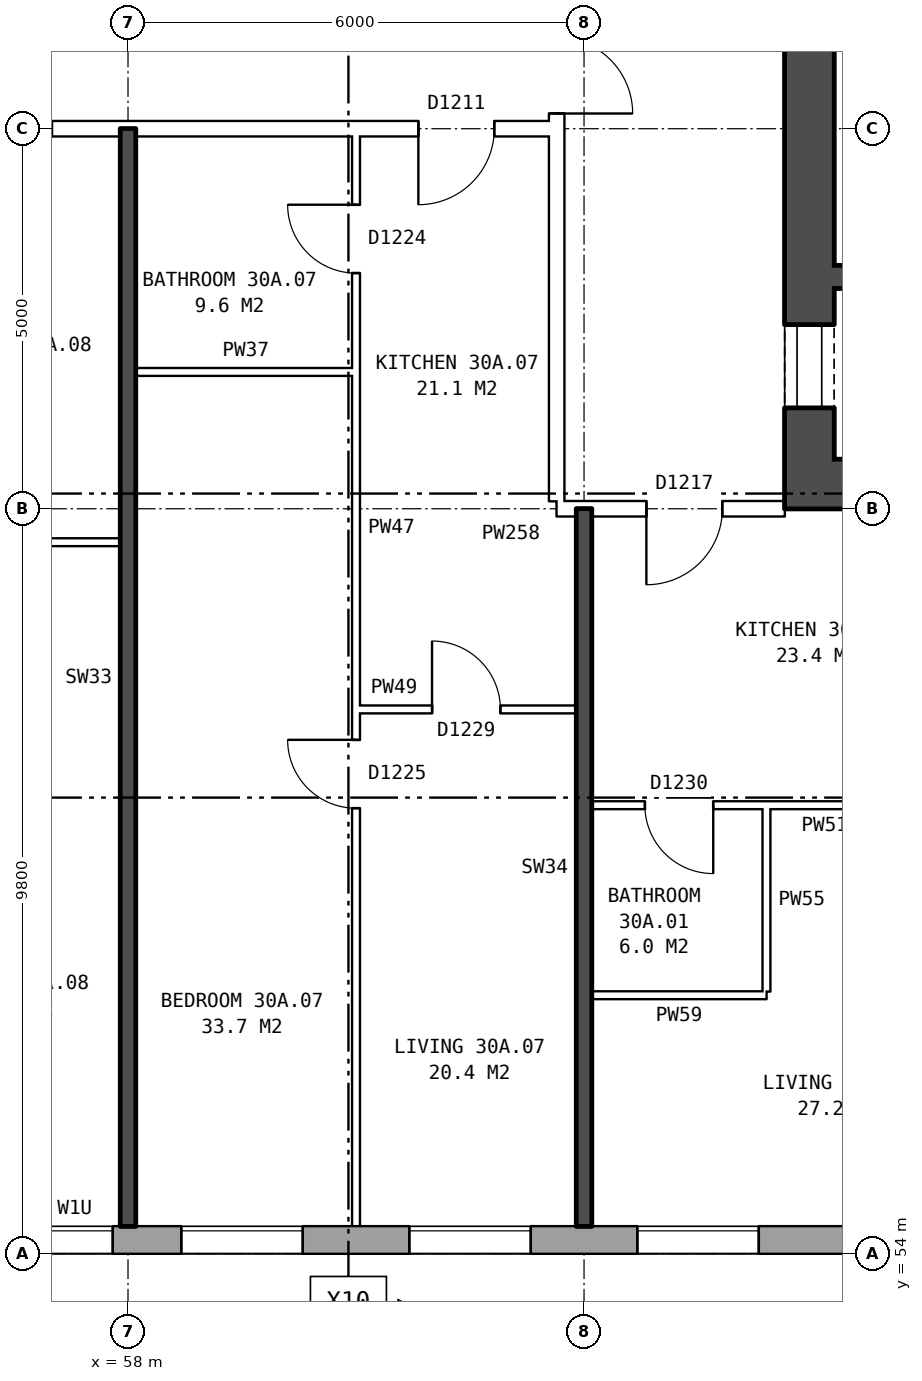
"""IFC4 building model, lengths in metres.
Left out: names, types, materials, properties, quantities, classifications, styles, units other than length and angle.
Written with IfcOpenShell. Run it as: python <this file> out.ifc"""

import sys

from ifc_helpers import new_model, si_unit, direction, frame, frame_2d, origin, place, context, subcontext, project, spatial, rectangle, extrude, element, fill, save


model = new_model("IFC4")
c1 = context("Model", 3, precision=1e-05, world=origin(), true_north=direction((0.0, 1.0)))
c2 = subcontext(c1, "Body", "Model", "MODEL_VIEW")
j1 = project(units=[si_unit("LENGTHUNIT", "METRE"), si_unit("PLANEANGLEUNIT", "RADIAN")], contexts=[c1])
p1 = place(None, origin())
s1 = spatial("IfcSite", under=j1, at=p1, CompositionType="ELEMENT")
p2 = place(p1, origin())
s2 = spatial("IfcBuilding", under=s1, at=p2, CompositionType="ELEMENT")
p3 = place(p2, frame((0.0, 0.0, 108.8)))
s3 = spatial("IfcBuildingStorey", under=s2, at=p3, CompositionType="ELEMENT", Elevation=108.8)
p4 = place(p3, frame((28.075, 54.18, 0.0), z_axis=(0.0, 0.0, 1.0), x_axis=(1.0, 0.0, 0.0)))
e1 = element("IfcWall", 1, at=p4, inside=s3, PredefinedType="STANDARD", context=c2, shape_type="SweptSolid", body=[
    extrude(rectangle(XDim=44.851, YDim=0.36, at=frame_2d((22.425, 0.0))), origin(), (0.0, 0.0, 1.0), 2.85),
])
p5 = place(p4, frame((0.625, 0.0, 0.8)))
e2 = element("IfcOpeningElement", 2, at=p5, cuts=e1, PredefinedType="OPENING", context=c2, shape_type="SweptSolid", body=[
    extrude(rectangle(XDim=1.6, YDim=1.8, at=frame_2d((0.8, 0.9))), frame((0.0, 0.19, 0.0), z_axis=(0.0, -1.0, 0.0), x_axis=(1.0, 0.0, 0.0)), (0.0, 0.0, 1.0), 0.38),
])
p6 = place(p4, frame((3.625, 0.0, 0.8)))
e3 = element("IfcOpeningElement", 3, at=p6, cuts=e1, PredefinedType="OPENING", context=c2, shape_type="SweptSolid", body=[
    extrude(rectangle(XDim=1.6, YDim=1.8, at=frame_2d((0.8, 0.9))), frame((0.0, 0.19, 0.0), z_axis=(0.0, -1.0, 0.0), x_axis=(1.0, 0.0, 0.0)), (0.0, 0.0, 1.0), 0.38),
])
p7 = place(p4, frame((6.625, 0.0, 0.8)))
e4 = element("IfcOpeningElement", 4, at=p7, cuts=e1, PredefinedType="OPENING", context=c2, shape_type="SweptSolid", body=[
    extrude(rectangle(XDim=1.6, YDim=1.8, at=frame_2d((0.8, 0.9))), frame((0.0, 0.19, 0.0), z_axis=(0.0, -1.0, 0.0), x_axis=(1.0, 0.0, 0.0)), (0.0, 0.0, 1.0), 0.38),
])
p8 = place(p4, frame((9.625, 0.0, 0.8)))
e5 = element("IfcOpeningElement", 5, at=p8, cuts=e1, PredefinedType="OPENING", context=c2, shape_type="SweptSolid", body=[
    extrude(rectangle(XDim=1.6, YDim=1.8, at=frame_2d((0.8, 0.9))), frame((0.0, 0.19, 0.0), z_axis=(0.0, -1.0, 0.0), x_axis=(1.0, 0.0, 0.0)), (0.0, 0.0, 1.0), 0.38),
])
p9 = place(p4, frame((12.625, 0.0, 0.8)))
e6 = element("IfcOpeningElement", 6, at=p9, cuts=e1, PredefinedType="OPENING", context=c2, shape_type="SweptSolid", body=[
    extrude(rectangle(XDim=1.6, YDim=1.8, at=frame_2d((0.8, 0.9))), frame((0.0, 0.19, 0.0), z_axis=(0.0, -1.0, 0.0), x_axis=(1.0, 0.0, 0.0)), (0.0, 0.0, 1.0), 0.38),
])
p10 = place(p4, frame((14.525, 0.0, 1.4)))
e7 = element("IfcOpeningElement", 7, at=p10, cuts=e1, PredefinedType="OPENING", context=c2, shape_type="SweptSolid", body=[
    extrude(rectangle(XDim=1.2, YDim=1.2, at=frame_2d((0.6, 0.6))), frame((0.0, 0.19, 0.0), z_axis=(0.0, -1.0, 0.0), x_axis=(1.0, 0.0, 0.0)), (0.0, 0.0, 1.0), 0.38),
])
p11 = place(p4, frame((18.625, 0.0, 0.8)))
e8 = element("IfcOpeningElement", 8, at=p11, cuts=e1, PredefinedType="OPENING", context=c2, shape_type="SweptSolid", body=[
    extrude(rectangle(XDim=1.6, YDim=1.8, at=frame_2d((0.8, 0.9))), frame((0.0, 0.19, 0.0), z_axis=(0.0, -1.0, 0.0), x_axis=(1.0, 0.0, 0.0)), (0.0, 0.0, 1.0), 0.38),
])
p12 = place(p4, frame((21.625, 0.0, 0.8)))
e9 = element("IfcOpeningElement", 9, at=p12, cuts=e1, PredefinedType="OPENING", context=c2, shape_type="SweptSolid", body=[
    extrude(rectangle(XDim=1.6, YDim=1.8, at=frame_2d((0.8, 0.9))), frame((0.0, 0.19, 0.0), z_axis=(0.0, -1.0, 0.0), x_axis=(1.0, 0.0, 0.0)), (0.0, 0.0, 1.0), 0.38),
])
p13 = place(p4, frame((24.625, 0.0, 0.8)))
e10 = element("IfcOpeningElement", 10, at=p13, cuts=e1, PredefinedType="OPENING", context=c2, shape_type="SweptSolid", body=[
    extrude(rectangle(XDim=1.6, YDim=1.8, at=frame_2d((0.8, 0.9))), frame((0.0, 0.19, 0.0), z_axis=(0.0, -1.0, 0.0), x_axis=(1.0, 0.0, 0.0)), (0.0, 0.0, 1.0), 0.38),
])
p14 = place(p4, frame((27.075, 0.0, 0.15)))
e11 = element("IfcOpeningElement", 11, at=p14, cuts=e1, PredefinedType="OPENING", context=c2, shape_type="SweptSolid", body=[
    extrude(rectangle(XDim=1.2, YDim=0.9, at=frame_2d((0.6, 0.45))), frame((0.0, 0.19, 0.0), z_axis=(0.0, -1.0, 0.0), x_axis=(1.0, 0.0, 0.0)), (0.0, 0.0, 1.0), 0.38),
])
p15 = place(p4, frame((30.625, 0.0, 0.8)))
e12 = element("IfcOpeningElement", 12, at=p15, cuts=e1, PredefinedType="OPENING", context=c2, shape_type="SweptSolid", body=[
    extrude(rectangle(XDim=1.6, YDim=1.8, at=frame_2d((0.8, 0.9))), frame((0.0, 0.19, 0.0), z_axis=(0.0, -1.0, 0.0), x_axis=(1.0, 0.0, 0.0)), (0.0, 0.0, 1.0), 0.38),
])
p16 = place(p4, frame((33.625, 0.0, 0.8)))
e13 = element("IfcOpeningElement", 13, at=p16, cuts=e1, PredefinedType="OPENING", context=c2, shape_type="SweptSolid", body=[
    extrude(rectangle(XDim=1.6, YDim=1.8, at=frame_2d((0.8, 0.9))), frame((0.0, 0.19, 0.0), z_axis=(0.0, -1.0, 0.0), x_axis=(1.0, 0.0, 0.0)), (0.0, 0.0, 1.0), 0.38),
])
p17 = place(p4, frame((36.625, 0.0, 0.8)))
e14 = element("IfcOpeningElement", 14, at=p17, cuts=e1, PredefinedType="OPENING", context=c2, shape_type="SweptSolid", body=[
    extrude(rectangle(XDim=1.6, YDim=1.8, at=frame_2d((0.8, 0.9))), frame((0.0, 0.19, 0.0), z_axis=(0.0, -1.0, 0.0), x_axis=(1.0, 0.0, 0.0)), (0.0, 0.0, 1.0), 0.38),
])
p18 = place(p4, frame((39.625, 0.0, 0.8)))
e15 = element("IfcOpeningElement", 15, at=p18, cuts=e1, PredefinedType="OPENING", context=c2, shape_type="SweptSolid", body=[
    extrude(rectangle(XDim=1.6, YDim=1.8, at=frame_2d((0.8, 0.9))), frame((0.0, 0.19, 0.0), z_axis=(0.0, -1.0, 0.0), x_axis=(1.0, 0.0, 0.0)), (0.0, 0.0, 1.0), 0.38),
])
p19 = place(p4, frame((42.625, 0.0, 0.8)))
e16 = element("IfcOpeningElement", 16, at=p19, cuts=e1, PredefinedType="OPENING", context=c2, shape_type="SweptSolid", body=[
    extrude(rectangle(XDim=1.6, YDim=1.8, at=frame_2d((0.8, 0.9))), frame((0.0, 0.19, 0.0), z_axis=(0.0, -1.0, 0.0), x_axis=(1.0, 0.0, 0.0)), (0.0, 0.0, 1.0), 0.38),
])
p20 = place(p4, frame((28.725, 0.0, 1.65)))
e17 = element("IfcOpeningElement", 17, at=p20, cuts=e1, PredefinedType="OPENING", context=c2, shape_type="SweptSolid", body=[
    extrude(rectangle(XDim=1.0, YDim=0.9, at=frame_2d((0.5, 0.45))), frame((0.0, 0.19, 0.0), z_axis=(0.0, -1.0, 0.0), x_axis=(1.0, 0.0, 0.0)), (0.0, 0.0, 1.0), 0.38),
])
p21 = place(p3, frame((66.965, 64.45, 0.0), z_axis=(0.0, 0.0, 1.0), x_axis=(0.0, 1.0, 0.0)))
e18 = element("IfcWall", 18, at=p21, inside=s3, PredefinedType="SHEAR", context=c2, shape_type="SweptSolid", body=[
    extrude(rectangle(XDim=11.1, YDim=0.65, at=frame_2d((5.55, 0.0))), origin(), (0.0, 0.0, 1.0), 2.85),
])
p22 = place(p21, frame((0.675, 0.0, 0.0)))
e19 = element("IfcOpeningElement", 19, at=p22, cuts=e18, PredefinedType="OPENING", context=c2, shape_type="SweptSolid", body=[
    extrude(rectangle(XDim=1.1, YDim=2.1, at=frame_2d((0.55, 1.05))), frame((0.0, 0.335, 0.0), z_axis=(0.0, -1.0, 0.0), x_axis=(1.0, 0.0, 0.0)), (0.0, 0.0, 1.0), 0.67),
])
p23 = place(p21, frame((9.25, 0.0, 0.0)))
e20 = element("IfcOpeningElement", 20, at=p23, cuts=e18, PredefinedType="OPENING", context=c2, shape_type="SweptSolid", body=[
    extrude(rectangle(XDim=1.1, YDim=2.1, at=frame_2d((0.55, 1.05))), frame((0.0, 0.335, 0.0), z_axis=(0.0, -1.0, 0.0), x_axis=(1.0, 0.0, 0.0)), (0.0, 0.0, 1.0), 0.67),
])
p24 = place(p3, frame((66.64, 64.125, 0.0), z_axis=(0.0, 0.0, 1.0), x_axis=(1.0, 0.0, 0.0)))
e21 = element("IfcWall", 21, at=p24, inside=s3, PredefinedType="SHEAR", context=c2, shape_type="SweptSolid", body=[
    extrude(rectangle(XDim=9.0, YDim=0.65, at=frame_2d((4.5, 0.0))), origin(), (0.0, 0.0, 1.0), 2.85),
])
p25 = place(p3, frame((67.29, 66.85, 0.0), z_axis=(0.0, 0.0, 1.0), x_axis=(1.0, 0.0, 0.0)))
e22 = element("IfcWall", 22, at=p25, inside=s3, PredefinedType="SHEAR", context=c2, shape_type="SweptSolid", body=[
    extrude(rectangle(XDim=3.37, YDim=0.3, at=frame_2d((1.685, 0.0))), origin(), (0.0, 0.0, 1.0), 2.85),
])
p26 = place(p3, frame((63.64, 63.9, 0.0), z_axis=(0.0, 0.0, 1.0), x_axis=(0.0, 1.0, 0.0)))
e23 = element("IfcWall", 23, at=p26, inside=s3, PredefinedType="PARTITIONING", context=c2, shape_type="SweptSolid", body=[
    extrude(rectangle(XDim=12.2, YDim=0.2, at=frame_2d((6.1, 0.0))), origin(), (0.0, 0.0, 1.0), 2.85),
])
p27 = place(p26, frame((5.1, 0.0, 0.0)))
e24 = element("IfcOpeningElement", 24, at=p27, cuts=e23, PredefinedType="OPENING", context=c2, shape_type="SweptSolid", body=[
    extrude(rectangle(XDim=2.0, YDim=2.1, at=frame_2d((1.0, 1.05))), frame((0.0, 0.11, 0.0), z_axis=(0.0, -1.0, 0.0), x_axis=(1.0, 0.0, 0.0)), (0.0, 0.0, 1.0), 0.22),
])
p28 = place(p3, frame((64.1, 57.4, 0.0), z_axis=(0.0, 0.0, 1.0), x_axis=(1.0, 0.0, 0.0)))
e25 = element("IfcWall", 25, at=p28, inside=s3, PredefinedType="PARTITIONING", context=c2, shape_type="SweptSolid", body=[
    extrude(rectangle(XDim=2.3, YDim=0.1, at=frame_2d((1.15, 0.0))), origin(), (0.0, 0.0, 1.0), 2.85),
])
p29 = place(p3, frame((64.1, 59.9, 0.0), z_axis=(0.0, 0.0, 1.0), x_axis=(1.0, 0.0, 0.0)))
e26 = element("IfcWall", 26, at=p29, inside=s3, PredefinedType="PARTITIONING", context=c2, shape_type="SweptSolid", body=[
    extrude(rectangle(XDim=5.8, YDim=0.1, at=frame_2d((2.9, 0.0))), origin(), (0.0, 0.0, 1.0), 2.85),
])
p30 = place(p29, frame((3.6, 0.0, 0.0)))
e27 = element("IfcOpeningElement", 27, at=p30, cuts=e26, PredefinedType="OPENING", context=c2, shape_type="SweptSolid", body=[
    extrude(rectangle(XDim=0.9, YDim=2.1, at=frame_2d((0.45, 1.05))), frame((0.0, 0.06, 0.0), z_axis=(0.0, -1.0, 0.0), x_axis=(1.0, 0.0, 0.0)), (0.0, 0.0, 1.0), 0.12),
])
p31 = place(p29, frame((0.7, 0.0, 0.0)))
e28 = element("IfcOpeningElement", 28, at=p31, cuts=e26, PredefinedType="OPENING", context=c2, shape_type="SweptSolid", body=[
    extrude(rectangle(XDim=0.9, YDim=2.1, at=frame_2d((0.45, 1.05))), frame((0.0, 0.06, 0.0), z_axis=(0.0, -1.0, 0.0), x_axis=(1.0, 0.0, 0.0)), (0.0, 0.0, 1.0), 0.12),
])
p32 = place(p3, frame((61.0, 61.16, 0.0), z_axis=(0.0, 0.0, 1.0), x_axis=(1.0, 0.0, 0.0)))
e29 = element("IfcWall", 29, at=p32, inside=s3, PredefinedType="PARTITIONING", context=c2, shape_type="SweptSolid", body=[
    extrude(rectangle(XDim=2.9, YDim=0.1, at=frame_2d((1.45, 0.0))), origin(), (0.0, 0.0, 1.0), 2.85),
])
p33 = place(p32, frame((1.0, 0.0, 0.0)))
e30 = element("IfcOpeningElement", 30, at=p33, cuts=e29, PredefinedType="OPENING", context=c2, shape_type="SweptSolid", body=[
    extrude(rectangle(XDim=0.9, YDim=2.1, at=frame_2d((0.45, 1.05))), frame((0.0, 0.06, 0.0), z_axis=(0.0, -1.0, 0.0), x_axis=(1.0, 0.0, 0.0)), (0.0, 0.0, 1.0), 0.12),
])
p34 = place(p3, frame((55.0, 63.36, 0.0), z_axis=(0.0, 0.0, 1.0), x_axis=(1.0, 0.0, 0.0)))
e31 = element("IfcWall", 31, at=p34, inside=s3, PredefinedType="PARTITIONING", context=c2, shape_type="SweptSolid", body=[
    extrude(rectangle(XDim=2.9, YDim=0.1, at=frame_2d((1.45, 0.0))), origin(), (0.0, 0.0, 1.0), 2.85),
])
p35 = place(p34, frame((1.0, 0.0, 0.0)))
e32 = element("IfcOpeningElement", 32, at=p35, cuts=e31, PredefinedType="OPENING", context=c2, shape_type="SweptSolid", body=[
    extrude(rectangle(XDim=0.9, YDim=2.1, at=frame_2d((0.45, 1.05))), frame((0.0, 0.06, 0.0), z_axis=(0.0, -1.0, 0.0), x_axis=(1.0, 0.0, 0.0)), (0.0, 0.0, 1.0), 0.12),
])
p36 = place(p3, frame((63.64, 63.8, 0.0), z_axis=(0.0, 0.0, 1.0), x_axis=(1.0, 0.0, 0.0)))
e33 = element("IfcWall", 33, at=p36, inside=s3, PredefinedType="PARTITIONING", context=c2, shape_type="SweptSolid", body=[
    extrude(rectangle(XDim=3.0, YDim=0.2, at=frame_2d((1.5, 0.0))), origin(), (0.0, 0.0, 1.0), 2.85),
])
p37 = place(p36, frame((1.18, 0.0, 0.0)))
e34 = element("IfcOpeningElement", 34, at=p37, cuts=e33, PredefinedType="OPENING", context=c2, shape_type="SweptSolid", body=[
    extrude(rectangle(XDim=1.0, YDim=2.1, at=frame_2d((0.5, 1.05))), frame((0.0, 0.11, 0.0), z_axis=(0.0, -1.0, 0.0), x_axis=(1.0, 0.0, 0.0)), (0.0, 0.0, 1.0), 0.22),
])
p38 = place(p3, frame((58.1, 65.6, 0.0), z_axis=(0.0, 0.0, 1.0), x_axis=(1.0, 0.0, 0.0)))
e35 = element("IfcWall", 35, at=p38, inside=s3, PredefinedType="PARTITIONING", context=c2, shape_type="SweptSolid", body=[
    extrude(rectangle(XDim=2.9, YDim=0.1, at=frame_2d((1.45, 0.0))), origin(), (0.0, 0.0, 1.0), 2.85),
])
p39 = place(p3, frame((44.36, 68.8, 0.0), z_axis=(0.0, 0.0, 1.0), x_axis=(1.0, 0.0, 0.0)))
e36 = element("IfcWall", 36, at=p39, inside=s3, PredefinedType="PARTITIONING", context=c2, shape_type="SweptSolid", body=[
    extrude(rectangle(XDim=19.28, YDim=0.2, at=frame_2d((9.64, 0.0))), origin(), (0.0, 0.0, 1.0), 2.85),
])
p40 = place(p39, frame((17.46, 0.0, 0.0)))
e37 = element("IfcOpeningElement", 37, at=p40, cuts=e36, PredefinedType="OPENING", context=c2, shape_type="SweptSolid", body=[
    extrude(rectangle(XDim=1.0, YDim=2.1, at=frame_2d((0.5, 1.05))), frame((0.0, 0.11, 0.0), z_axis=(0.0, -1.0, 0.0), x_axis=(1.0, 0.0, 0.0)), (0.0, 0.0, 1.0), 0.22),
])
p41 = place(p39, frame((11.64, 0.0, 0.0)))
e38 = element("IfcOpeningElement", 38, at=p41, cuts=e36, PredefinedType="OPENING", context=c2, shape_type="SweptSolid", body=[
    extrude(rectangle(XDim=1.0, YDim=2.1, at=frame_2d((0.5, 1.05))), frame((0.0, 0.11, 0.0), z_axis=(0.0, -1.0, 0.0), x_axis=(1.0, 0.0, 0.0)), (0.0, 0.0, 1.0), 0.22),
])
p42 = place(p39, frame((2.64, 0.0, 0.0)))
e39 = element("IfcOpeningElement", 39, at=p42, cuts=e36, PredefinedType="OPENING", context=c2, shape_type="SweptSolid", body=[
    extrude(rectangle(XDim=1.0, YDim=2.1, at=frame_2d((0.5, 1.05))), frame((0.0, 0.11, 0.0), z_axis=(0.0, -1.0, 0.0), x_axis=(1.0, 0.0, 0.0)), (0.0, 0.0, 1.0), 0.22),
])
p43 = place(p3, frame((58.0, 54.36, 0.0), z_axis=(0.0, 0.0, 1.0), x_axis=(0.0, 1.0, 0.0)))
e40 = element("IfcWall", 40, at=p43, inside=s3, PredefinedType="SOLIDWALL", context=c2, shape_type="SweptSolid", body=[
    extrude(rectangle(XDim=14.44, YDim=0.2, at=frame_2d((7.22, 0.0))), origin(), (0.0, 0.0, 1.0), 2.85),
])
p44 = place(p3, frame((61.0, 54.36, 0.0), z_axis=(0.0, 0.0, 1.0), x_axis=(0.0, 1.0, 0.0)))
e41 = element("IfcWall", 41, at=p44, inside=s3, PredefinedType="PARTITIONING", context=c2, shape_type="SweptSolid", body=[
    extrude(rectangle(XDim=14.34, YDim=0.1, at=frame_2d((7.17, 0.0))), origin(), (0.0, 0.0, 1.0), 2.85),
])
p45 = place(p44, frame((5.5, 0.0, 0.0)))
e42 = element("IfcOpeningElement", 42, at=p45, cuts=e41, PredefinedType="OPENING", context=c2, shape_type="SweptSolid", body=[
    extrude(rectangle(XDim=0.9, YDim=2.1, at=frame_2d((0.45, 1.05))), frame((0.0, 0.06, 0.0), z_axis=(0.0, -1.0, 0.0), x_axis=(1.0, 0.0, 0.0)), (0.0, 0.0, 1.0), 0.12),
])
p46 = place(p44, frame((12.54, 0.0, 0.0)))
e43 = element("IfcOpeningElement", 43, at=p46, cuts=e41, PredefinedType="OPENING", context=c2, shape_type="SweptSolid", body=[
    extrude(rectangle(XDim=0.9, YDim=2.1, at=frame_2d((0.45, 1.05))), frame((0.0, 0.06, 0.0), z_axis=(0.0, -1.0, 0.0), x_axis=(1.0, 0.0, 0.0)), (0.0, 0.0, 1.0), 0.12),
])
p47 = place(p3, frame((64.0, 54.36, 0.0), z_axis=(0.0, 0.0, 1.0), x_axis=(0.0, 1.0, 0.0)))
e44 = element("IfcWall", 44, at=p47, inside=s3, PredefinedType="SOLIDWALL", context=c2, shape_type="SweptSolid", body=[
    extrude(rectangle(XDim=9.44, YDim=0.2, at=frame_2d((4.72, 0.0))), origin(), (0.0, 0.0, 1.0), 2.85),
])
p48 = place(p3, frame((66.4, 57.45, 0.0), z_axis=(0.0, 0.0, 1.0), x_axis=(0.0, 1.0, 0.0)))
e45 = element("IfcWall", 45, at=p48, inside=s3, PredefinedType="PARTITIONING", context=c2, shape_type="SweptSolid", body=[
    extrude(rectangle(XDim=2.4, YDim=0.1, at=frame_2d((1.2, 0.0))), origin(), (0.0, 0.0, 1.0), 2.85),
])
p49 = place(p15, origin())
e46 = element("IfcWindow", 46, at=p49, inside=s3, PartitioningType="SINGLE_PANEL", PredefinedType="WINDOW", context=c2, shape_type="SweptSolid", body=[
    extrude(rectangle(XDim=1.6, YDim=1.8, at=frame_2d((0.8, 0.9))), frame((0.0, 0.15, 0.0), z_axis=(0.0, -1.0, 0.0), x_axis=(1.0, 0.0, 0.0)), (0.0, 0.0, 1.0), 0.06),
])
fill(e12, e46)
p50 = place(p16, origin())
e47 = element("IfcWindow", 47, at=p50, inside=s3, PartitioningType="SINGLE_PANEL", PredefinedType="WINDOW", context=c2, shape_type="SweptSolid", body=[
    extrude(rectangle(XDim=1.6, YDim=1.8, at=frame_2d((0.8, 0.9))), frame((0.0, 0.15, 0.0), z_axis=(0.0, -1.0, 0.0), x_axis=(1.0, 0.0, 0.0)), (0.0, 0.0, 1.0), 0.06),
])
fill(e13, e47)
p51 = place(p17, origin())
e48 = element("IfcWindow", 48, at=p51, inside=s3, PartitioningType="SINGLE_PANEL", PredefinedType="WINDOW", context=c2, shape_type="SweptSolid", body=[
    extrude(rectangle(XDim=1.6, YDim=1.8, at=frame_2d((0.8, 0.9))), frame((0.0, 0.15, 0.0), z_axis=(0.0, -1.0, 0.0), x_axis=(1.0, 0.0, 0.0)), (0.0, 0.0, 1.0), 0.06),
])
fill(e14, e48)
p52 = place(p22, origin())
e49 = element("IfcDoor", 49, at=p52, inside=s3, OperationType="DOUBLE_DOOR_SLIDING", PredefinedType="DOOR", context=c2, shape_type="SweptSolid", body=[
    extrude(rectangle(XDim=1.1, YDim=2.1, at=frame_2d((0.55, 1.05))), frame((0.0, -0.26, 0.0), z_axis=(0.0, -1.0, 0.0), x_axis=(1.0, 0.0, 0.0)), (0.0, 0.0, 1.0), 0.05),
])
fill(e19, e49)
p53 = place(p27, frame((2.0, 0.0, 0.0), z_axis=(0.0, 0.0, 1.0), x_axis=(-1.0, 0.0, 0.0)))
e50 = element("IfcDoor", 50, at=p53, inside=s3, OperationType="DOUBLE_DOOR_SINGLE_SWING", PredefinedType="DOOR", context=c2, shape_type="SweptSolid", body=[
    extrude(rectangle(XDim=2.0, YDim=2.1, at=frame_2d((1.0, 1.05))), frame((0.0, 0.025, 0.0), z_axis=(0.0, -1.0, 0.0), x_axis=(1.0, 0.0, 0.0)), (0.0, 0.0, 1.0), 0.05),
])
fill(e24, e50)
p54 = place(p37, frame((1.0, 0.0, 0.0), z_axis=(0.0, 0.0, 1.0), x_axis=(-1.0, 0.0, 0.0)))
e51 = element("IfcDoor", 51, at=p54, inside=s3, OperationType="SINGLE_SWING_RIGHT", PredefinedType="DOOR", context=c2, shape_type="SweptSolid", body=[
    extrude(rectangle(XDim=1.0, YDim=2.1, at=frame_2d((0.5, 1.05))), frame((0.0, 0.025, 0.0), z_axis=(0.0, -1.0, 0.0), x_axis=(1.0, 0.0, 0.0)), (0.0, 0.0, 1.0), 0.05),
])
fill(e34, e51)
p55 = place(p31, frame((0.9, 0.0, 0.0), z_axis=(0.0, 0.0, 1.0), x_axis=(-1.0, 0.0, 0.0)))
e52 = element("IfcDoor", 52, at=p55, inside=s3, OperationType="SINGLE_SWING_LEFT", PredefinedType="DOOR", context=c2, shape_type="SweptSolid", body=[
    extrude(rectangle(XDim=0.9, YDim=2.1, at=frame_2d((0.45, 1.05))), frame((0.0, 0.025, 0.0), z_axis=(0.0, -1.0, 0.0), x_axis=(1.0, 0.0, 0.0)), (0.0, 0.0, 1.0), 0.05),
])
fill(e28, e52)
p56 = place(p45, origin())
e53 = element("IfcDoor", 53, at=p56, inside=s3, OperationType="SINGLE_SWING_RIGHT", PredefinedType="DOOR", context=c2, shape_type="SweptSolid", body=[
    extrude(rectangle(XDim=0.9, YDim=2.1, at=frame_2d((0.45, 1.05))), frame((0.0, 0.025, 0.0), z_axis=(0.0, -1.0, 0.0), x_axis=(1.0, 0.0, 0.0)), (0.0, 0.0, 1.0), 0.05),
])
fill(e42, e53)
p57 = place(p40, frame((1.0, 0.0, 0.0), z_axis=(0.0, 0.0, 1.0), x_axis=(-1.0, 0.0, 0.0)))
e54 = element("IfcDoor", 54, at=p57, inside=s3, OperationType="SINGLE_SWING_RIGHT", PredefinedType="DOOR", context=c2, shape_type="SweptSolid", body=[
    extrude(rectangle(XDim=1.0, YDim=2.1, at=frame_2d((0.5, 1.05))), frame((0.0, 0.025, 0.0), z_axis=(0.0, -1.0, 0.0), x_axis=(1.0, 0.0, 0.0)), (0.0, 0.0, 1.0), 0.05),
])
fill(e37, e54)
p58 = place(p33, origin())
e55 = element("IfcDoor", 55, at=p58, inside=s3, OperationType="SINGLE_SWING_LEFT", PredefinedType="DOOR", context=c2, shape_type="SweptSolid", body=[
    extrude(rectangle(XDim=0.9, YDim=2.1, at=frame_2d((0.45, 1.05))), frame((0.0, 0.025, 0.0), z_axis=(0.0, -1.0, 0.0), x_axis=(1.0, 0.0, 0.0)), (0.0, 0.0, 1.0), 0.05),
])
fill(e30, e55)
p59 = place(p46, origin())
e56 = element("IfcDoor", 56, at=p59, inside=s3, OperationType="SINGLE_SWING_RIGHT", PredefinedType="DOOR", context=c2, shape_type="SweptSolid", body=[
    extrude(rectangle(XDim=0.9, YDim=2.1, at=frame_2d((0.45, 1.05))), frame((0.0, 0.025, 0.0), z_axis=(0.0, -1.0, 0.0), x_axis=(1.0, 0.0, 0.0)), (0.0, 0.0, 1.0), 0.05),
])
fill(e43, e56)
p60 = place(p20, origin())
e57 = element("IfcWindow", 57, at=p60, inside=s3, PartitioningType="SINGLE_PANEL", PredefinedType="WINDOW", context=c2, shape_type="SweptSolid", body=[
    extrude(rectangle(XDim=1.0, YDim=0.9, at=frame_2d((0.5, 0.45))), frame((0.0, 0.15, 0.0), z_axis=(0.0, -1.0, 0.0), x_axis=(1.0, 0.0, 0.0)), (0.0, 0.0, 1.0), 0.06),
])
fill(e17, e57)
save(model, sys.argv[1])
